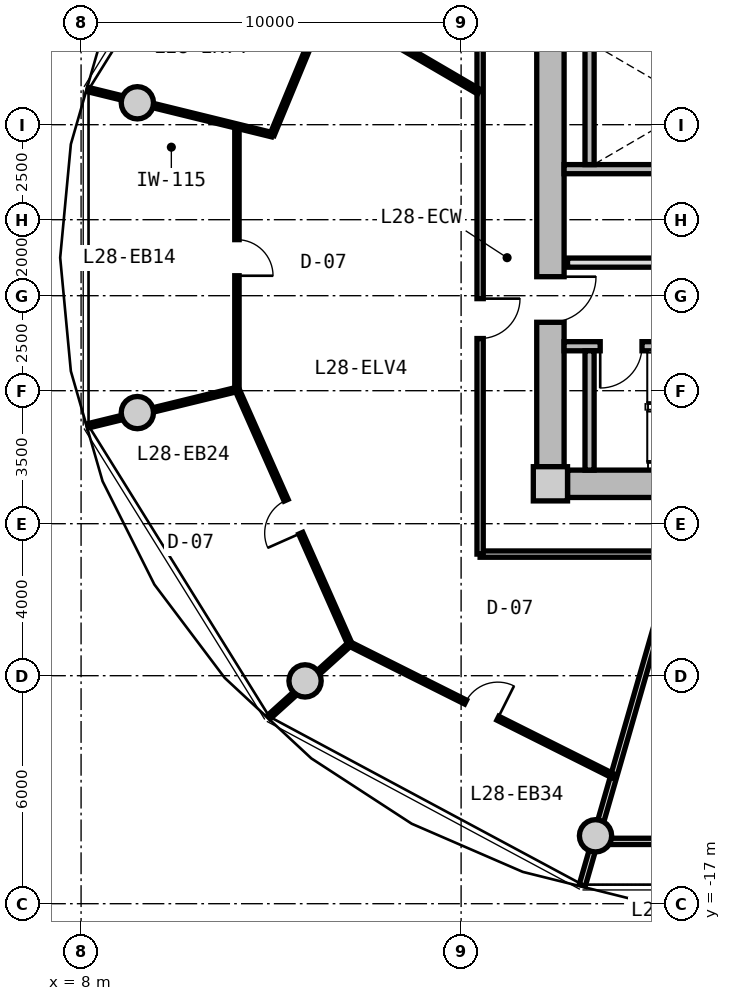
"""IFC4 building model, lengths in metres.
Left out: names, types, materials, properties, quantities, classifications, styles, units other than length and angle.
Written with IfcOpenShell. Run it as: python <this file> out.ifc"""

import sys

from ifc_helpers import new_model, si_unit, direction, frame, frame_2d, origin, origin_2d, place, context, subcontext, project, spatial, rectangle, circle, extrude, source, transform, mapped, element, fill, save


model = new_model("IFC4")
c1 = context("Model", 3, precision=1e-05, world=origin(), true_north=direction((0.0, 1.0)))
c2 = subcontext(c1, "Body", "Model", "MODEL_VIEW")
j1 = project(units=[si_unit("LENGTHUNIT", "METRE"), si_unit("PLANEANGLEUNIT", "RADIAN")], contexts=[c1])
p1 = place(None, origin())
s1 = spatial("IfcSite", under=j1, at=p1, CompositionType="ELEMENT")
p2 = place(p1, origin())
s2 = spatial("IfcBuilding", under=s1, at=p2, CompositionType="ELEMENT")
p3 = place(p2, frame((0.0, 0.0, 93.2)))
s3 = spatial("IfcBuildingStorey", under=s2, at=p3, CompositionType="ELEMENT", Elevation=93.2)
m1 = source(origin(), c2, "Body", "SweptSolid", [
    extrude(rectangle(XDim=0.9, YDim=0.9, at=origin_2d()), origin(), (0.0, 0.0, 1.0), 3.05),
])
p4 = place(p3, frame((20.35, -5.95, 0.0), z_axis=(0.0, 0.0, 1.0), x_axis=(1.0, 0.0, 0.0)))
e1 = element("IfcColumn", 1, at=p4, inside=s3, PredefinedType="COLUMN", context=c2, shape_type="MappedRepresentation", body=[
    mapped(m1, transform((0.0, 0.0, 0.0), x_axis=(1.0, 0.0, 0.0), y_axis=(0.0, 1.0, 0.0), z_axis=(0.0, 0.0, 1.0), scale=1.0)),
])
m2 = source(origin(), c2, "Body", "SweptSolid", [
    extrude(rectangle(XDim=14.4, YDim=0.72, at=frame_2d((7.2, 0.0))), origin(), (0.0, 0.0, 1.0), 2.79),
])
p5 = place(p3, frame((35.2, -5.95, 0.0), z_axis=(0.0, 0.0, 1.0), x_axis=(-1.0, 0.0, 0.0)))
e2 = element("IfcWall", 2, at=p5, inside=s3, PredefinedType="SHEAR", context=c2, shape_type="MappedRepresentation", body=[
    mapped(m2, transform((0.0, 0.0, 0.0), x_axis=(1.0, 0.0, 0.0), y_axis=(0.0, 1.0, 0.0), z_axis=(0.0, 0.0, 1.0), scale=1.0)),
])
m3 = source(origin(), c2, "Body", "SweptSolid", [
    extrude(rectangle(XDim=11.0, YDim=0.72, at=frame_2d((5.5, 0.0))), origin(), (0.0, 0.0, 1.0), 2.79),
])
p6 = place(p3, frame((20.35, -5.5, 0.0), z_axis=(0.0, 0.0, 1.0), x_axis=(0.0, 1.0, 0.0)))
e3 = element("IfcWall", 3, at=p6, inside=s3, PredefinedType="SHEAR", context=c2, shape_type="MappedRepresentation", body=[
    mapped(m3, transform((0.0, 0.0, 0.0), x_axis=(1.0, 0.0, 0.0), y_axis=(0.0, 1.0, 0.0), z_axis=(0.0, 0.0, 1.0), scale=1.0)),
])
p7 = place(p6, frame((3.8, 0.0, 0.0)))
e4 = element("IfcOpeningElement", 4, at=p7, cuts=e3, PredefinedType="OPENING", context=c2, shape_type="SweptSolid", body=[
    extrude(rectangle(XDim=1.2, YDim=2.15, at=frame_2d((0.6, 1.075))), frame((0.0, 0.37, 0.0), z_axis=(0.0, -1.0, 0.0), x_axis=(1.0, 0.0, 0.0)), (0.0, 0.0, 1.0), 0.74),
])
m4 = source(origin(), c2, "Body", "SweptSolid", [
    extrude(circle(Radius=0.425, at=origin_2d()), origin(), (0.0, 0.0, 1.0), 3.05),
])
for number, where, z_axis, x_axis in (
    (5, (9.481, 4.076, 0.0), (0.0, 0.0, 1.0), (1.0, 0.0, 0.0)),
    (6, (9.481, -4.076, 0.0), (0.0, 0.0, 1.0), (1.0, 0.0, 0.0)),
    (7, (13.894, -11.137, 0.0), (0.0, 0.0, 1.0), (1.0, 0.0, 0.0)),
    (8, (21.537, -15.213, 0.0), (0.0, 0.0, 1.0), (1.0, 0.0, 0.0)),
):
    element("IfcColumn", number, at=place(p3, frame(where, z_axis=z_axis, x_axis=x_axis)), inside=s3, PredefinedType="COLUMN", context=c2, shape_type="MappedRepresentation", body=[
        mapped(m4, transform((0.0, 0.0, 0.0), x_axis=(1.0, 0.0, 0.0), y_axis=(0.0, 1.0, 0.0), z_axis=(0.0, 0.0, 1.0), scale=1.0)),
    ])
m5 = source(origin(), c2, "Body", "SweptSolid", [
    extrude(rectangle(XDim=7.83, YDim=0.24, at=frame_2d((3.915, 0.0))), origin(), (0.0, 0.0, 1.0), 2.79),
])
p8 = place(p3, frame((20.71, 2.33, 0.0), z_axis=(0.0, 0.0, 1.0), x_axis=(1.0, 0.0, 0.0)))
e9 = element("IfcWall", 9, at=p8, inside=s3, PredefinedType="PARTITIONING", context=c2, shape_type="MappedRepresentation", body=[
    mapped(m5, transform((0.0, 0.0, 0.0), x_axis=(1.0, 0.0, 0.0), y_axis=(0.0, 1.0, 0.0), z_axis=(0.0, 0.0, 1.0), scale=1.0)),
])
m6 = source(origin(), c2, "Body", "SweptSolid", [
    extrude(rectangle(XDim=3.14, YDim=0.24, at=frame_2d((1.57, 0.0))), origin(), (0.0, 0.0, 1.0), 2.79),
])
p9 = place(p3, frame((21.38, 2.45, 0.0), z_axis=(0.0, 0.0, 1.0), x_axis=(0.0, 1.0, 0.0)))
e10 = element("IfcWall", 10, at=p9, inside=s3, PredefinedType="PARTITIONING", context=c2, shape_type="MappedRepresentation", body=[
    mapped(m6, transform((0.0, 0.0, 0.0), x_axis=(1.0, 0.0, 0.0), y_axis=(0.0, 1.0, 0.0), z_axis=(0.0, 0.0, 1.0), scale=1.0)),
])
p10 = place(p3, frame((20.71, -2.33, 0.0), z_axis=(0.0, 0.0, 1.0), x_axis=(1.0, 0.0, 0.0)))
e11 = element("IfcWall", 11, at=p10, inside=s3, PredefinedType="PARTITIONING", context=c2, shape_type="MappedRepresentation", body=[
    mapped(m5, transform((0.0, 0.0, 0.0), x_axis=(1.0, 0.0, 0.0), y_axis=(0.0, 1.0, 0.0), z_axis=(0.0, 0.0, 1.0), scale=1.0)),
])
p11 = place(p10, frame((0.95, 0.0, 0.0)))
e12 = element("IfcOpeningElement", 12, at=p11, cuts=e11, PredefinedType="OPENING", context=c2, shape_type="SweptSolid", body=[
    extrude(rectangle(XDim=1.1, YDim=2.15, at=frame_2d((0.55, 1.075))), frame((0.0, 0.13, 0.0), z_axis=(0.0, -1.0, 0.0), x_axis=(1.0, 0.0, 0.0)), (0.0, 0.0, 1.0), 0.26),
])
p12 = place(p3, frame((21.38, -5.59, 0.0), z_axis=(0.0, 0.0, 1.0), x_axis=(0.0, 1.0, 0.0)))
e13 = element("IfcWall", 13, at=p12, inside=s3, PredefinedType="PARTITIONING", context=c2, shape_type="MappedRepresentation", body=[
    mapped(m6, transform((0.0, 0.0, 0.0), x_axis=(1.0, 0.0, 0.0), y_axis=(0.0, 1.0, 0.0), z_axis=(0.0, 0.0, 1.0), scale=1.0)),
])
m7 = source(origin(), c2, "Body", "SweptSolid", [
    extrude(rectangle(XDim=7.62, YDim=0.24, at=frame_2d((3.81, 0.0))), origin(), (0.0, 0.0, 1.0), 2.775),
])
p13 = place(p3, frame((20.8, -0.13, 0.0), z_axis=(0.0, 0.0, 1.0), x_axis=(1.0, 0.0, 0.0)))
e14 = element("IfcWall", 14, at=p13, inside=s3, PredefinedType="PARTITIONING", context=c2, shape_type="MappedRepresentation", body=[
    mapped(m7, transform((0.0, 0.0, 0.0), x_axis=(1.0, 0.0, 0.0), y_axis=(0.0, 1.0, 0.0), z_axis=(0.0, 0.0, 1.0), scale=1.0)),
])
p14 = place(p13, frame((6.22, 0.0, 0.0)))
e15 = element("IfcOpeningElement", 15, at=p14, cuts=e14, PredefinedType="OPENING", context=c2, shape_type="SweptSolid", body=[
    extrude(rectangle(XDim=1.0, YDim=2.1, at=frame_2d((0.5, 1.05))), frame((0.0, 0.13, 0.0), z_axis=(0.0, -1.0, 0.0), x_axis=(1.0, 0.0, 0.0)), (0.0, 0.0, 1.0), 0.26),
])
p15 = place(p13, frame((2.4, 0.0, 0.0)))
e16 = element("IfcOpeningElement", 16, at=p15, cuts=e14, PredefinedType="OPENING", context=c2, shape_type="SweptSolid", body=[
    extrude(rectangle(XDim=1.0, YDim=2.1, at=frame_2d((0.5, 1.05))), frame((0.0, 0.13, 0.0), z_axis=(0.0, -1.0, 0.0), x_axis=(1.0, 0.0, 0.0)), (0.0, 0.0, 1.0), 0.26),
])
m8 = source(origin(), c2, "Body", "SweptSolid", [
    extrude(rectangle(XDim=8.6, YDim=0.165, at=frame_2d((4.3, 0.0))), origin(), (0.0, 0.0, 1.0), 2.775),
])
p16 = place(p3, frame((27.1, -7.8, 0.0), z_axis=(0.0, 0.0, 1.0), x_axis=(-1.0, 0.0, 0.0)))
e17 = element("IfcWall", 17, at=p16, inside=s3, PredefinedType="PARTITIONING", context=c2, shape_type="MappedRepresentation", body=[
    mapped(m8, transform((0.0, 0.0, 0.0), x_axis=(1.0, 0.0, 0.0), y_axis=(0.0, 1.0, 0.0), z_axis=(0.0, 0.0, 1.0), scale=1.0)),
])
m9 = source(origin(), c2, "Body", "SweptSolid", [
    extrude(rectangle(XDim=15.6, YDim=0.165, at=frame_2d((7.8, 0.0))), origin(), (0.0, 0.0, 1.0), 2.775),
])
p17 = place(p3, frame((18.5, -7.8, 0.0), z_axis=(0.0, 0.0, 1.0), x_axis=(0.0, 1.0, 0.0)))
e18 = element("IfcWall", 18, at=p17, inside=s3, PredefinedType="PARTITIONING", context=c2, shape_type="MappedRepresentation", body=[
    mapped(m9, transform((0.0, 0.0, 0.0), x_axis=(1.0, 0.0, 0.0), y_axis=(0.0, 1.0, 0.0), z_axis=(0.0, 0.0, 1.0), scale=1.0)),
])
p18 = place(p17, frame((5.673, 0.0, 0.0)))
e19 = element("IfcOpeningElement", 19, at=p18, cuts=e18, PredefinedType="OPENING", context=c2, shape_type="SweptSolid", body=[
    extrude(rectangle(XDim=1.05, YDim=2.15, at=frame_2d((0.525, 1.075))), frame((0.0, 0.093, 0.0), z_axis=(0.0, -1.0, 0.0), x_axis=(1.0, 0.0, 0.0)), (0.0, 0.0, 1.0), 0.185),
])
m10 = source(origin(), c2, "Body", "SweptSolid", [
    extrude(rectangle(XDim=8.989, YDim=0.165, at=frame_2d((4.495, 0.0))), origin(), (0.0, 0.0, 1.0), 2.275),
])
p19 = place(p3, frame((23.678, -7.88, 0.0), z_axis=(0.0, 0.0, 1.0), x_axis=(-0.27702323008, -0.960863221274, 0.0)))
e20 = element("IfcWall", 20, at=p19, inside=s3, PredefinedType="PARTITIONING", context=c2, shape_type="MappedRepresentation", body=[
    mapped(m10, transform((0.0, 0.0, 0.0), x_axis=(1.0, 0.0, 0.0), y_axis=(0.0, 1.0, 0.0), z_axis=(0.0, 0.0, 1.0), scale=1.0)),
])
m11 = source(origin(), c2, "Body", "SweptSolid", [
    extrude(rectangle(XDim=5.814, YDim=0.165, at=frame_2d((2.907, 0.0))), origin(), (0.0, 0.0, 1.0), 2.275),
])
p20 = place(p3, frame((21.366, -15.36, 0.0), z_axis=(0.0, 0.0, 1.0), x_axis=(1.0, 0.0, 0.0)))
e21 = element("IfcWall", 21, at=p20, inside=s3, PredefinedType="PARTITIONING", context=c2, shape_type="MappedRepresentation", body=[
    mapped(m11, transform((0.0, 0.0, 0.0), x_axis=(1.0, 0.0, 0.0), y_axis=(0.0, 1.0, 0.0), z_axis=(0.0, 0.0, 1.0), scale=1.0)),
])
m12 = source(origin(), c2, "Body", "SweptSolid", [
    extrude(rectangle(XDim=6.935, YDim=0.115, at=frame_2d((3.468, 0.0))), origin(), (0.0, 0.0, 1.0), 2.775),
])
p21 = place(p3, frame((12.101, 3.468, 0.0), z_axis=(0.0, 0.0, 1.0), x_axis=(0.0, -1.0, 0.0)))
e22 = element("IfcWall", 22, at=p21, inside=s3, PredefinedType="PARTITIONING", context=c2, shape_type="MappedRepresentation", body=[
    mapped(m12, transform((0.0, 0.0, 0.0), x_axis=(1.0, 0.0, 0.0), y_axis=(0.0, 1.0, 0.0), z_axis=(0.0, 0.0, 1.0), scale=1.0)),
])
p22 = place(p21, frame((2.993, 0.0, 0.0)))
e23 = element("IfcOpeningElement", 23, at=p22, cuts=e22, PredefinedType="OPENING", context=c2, shape_type="SweptSolid", body=[
    extrude(rectangle(XDim=0.95, YDim=2.1, at=frame_2d((0.475, 1.05))), frame((0.0, 0.067, 0.0), z_axis=(0.0, -1.0, 0.0), x_axis=(1.0, 0.0, 0.0)), (0.0, 0.0, 1.0), 0.135),
])
m13 = source(origin(), c2, "Body", "SweptSolid", [
    extrude(rectangle(XDim=4.992, YDim=0.115, at=frame_2d((2.496, 0.0))), origin(), (0.0, 0.0, 1.0), 2.275),
])
p23 = place(p3, frame((13.026, 3.236, 0.0), z_axis=(0.0, 0.0, 1.0), x_axis=(-0.971191841847, 0.238298985162, 0.0)))
e24 = element("IfcWall", 24, at=p23, inside=s3, PredefinedType="PARTITIONING", context=c2, shape_type="MappedRepresentation", body=[
    mapped(m13, transform((0.0, 0.0, 0.0), x_axis=(1.0, 0.0, 0.0), y_axis=(0.0, 1.0, 0.0), z_axis=(0.0, 0.0, 1.0), scale=1.0)),
])
m14 = source(origin(), c2, "Body", "SweptSolid", [
    extrude(rectangle(XDim=7.326, YDim=0.115, at=frame_2d((3.663, 0.0))), origin(), (0.0, 0.0, 1.0), 2.775),
])
p24 = place(p3, frame((12.104, -3.467, 0.0), z_axis=(0.0, 0.0, 1.0), x_axis=(0.405263245425, -0.914200033859, 0.0)))
e25 = element("IfcWall", 25, at=p24, inside=s3, PredefinedType="PARTITIONING", context=c2, shape_type="MappedRepresentation", body=[
    mapped(m14, transform((0.0, 0.0, 0.0), x_axis=(1.0, 0.0, 0.0), y_axis=(0.0, 1.0, 0.0), z_axis=(0.0, 0.0, 1.0), scale=1.0)),
])
p25 = place(p24, frame((3.188, 0.0, 0.0)))
e26 = element("IfcOpeningElement", 26, at=p25, cuts=e25, PredefinedType="OPENING", context=c2, shape_type="SweptSolid", body=[
    extrude(rectangle(XDim=0.95, YDim=2.1, at=frame_2d((0.475, 1.05))), frame((0.0, 0.067, 0.0), z_axis=(0.0, -1.0, 0.0), x_axis=(1.0, 0.0, 0.0)), (0.0, 0.0, 1.0), 0.135),
])
m15 = source(origin(), c2, "Body", "SweptSolid", [
    extrude(rectangle(XDim=4.042, YDim=0.115, at=frame_2d((2.021, 0.0))), origin(), (0.0, 0.0, 1.0), 2.275),
])
p26 = place(p3, frame((12.104, -3.467, 0.0), z_axis=(0.0, 0.0, 1.0), x_axis=(-0.971460277747, -0.237202295014, 0.0)))
e27 = element("IfcWall", 27, at=p26, inside=s3, PredefinedType="PARTITIONING", context=c2, shape_type="MappedRepresentation", body=[
    mapped(m15, transform((0.0, 0.0, 0.0), x_axis=(1.0, 0.0, 0.0), y_axis=(0.0, 1.0, 0.0), z_axis=(0.0, 0.0, 1.0), scale=1.0)),
])
m16 = source(origin(), c2, "Body", "SweptSolid", [
    extrude(rectangle(XDim=7.767, YDim=0.115, at=frame_2d((3.884, 0.0))), origin(), (0.0, 0.0, 1.0), 2.775),
])
p27 = place(p3, frame((15.07, -10.167, 0.0), z_axis=(0.0, 0.0, 1.0), x_axis=(0.894188177352, -0.447691303783, 0.0)))
e28 = element("IfcWall", 28, at=p27, inside=s3, PredefinedType="PARTITIONING", context=c2, shape_type="MappedRepresentation", body=[
    mapped(m16, transform((0.0, 0.0, 0.0), x_axis=(1.0, 0.0, 0.0), y_axis=(0.0, 1.0, 0.0), z_axis=(0.0, 0.0, 1.0), scale=1.0)),
])
p28 = place(p27, frame((3.409, 0.0, 0.0)))
e29 = element("IfcOpeningElement", 29, at=p28, cuts=e28, PredefinedType="OPENING", context=c2, shape_type="SweptSolid", body=[
    extrude(rectangle(XDim=0.95, YDim=2.1, at=frame_2d((0.475, 1.05))), frame((0.0, 0.067, 0.0), z_axis=(0.0, -1.0, 0.0), x_axis=(1.0, 0.0, 0.0)), (0.0, 0.0, 1.0), 0.135),
])
m17 = source(origin(), c2, "Body", "SweptSolid", [
    extrude(rectangle(XDim=2.871, YDim=0.115, at=frame_2d((1.435, 0.0))), origin(), (0.0, 0.0, 1.0), 2.275),
])
p29 = place(p3, frame((15.07, -10.167, 0.0), z_axis=(0.0, 0.0, 1.0), x_axis=(-0.742125841552, -0.670260572688, 0.0)))
e30 = element("IfcWall", 30, at=p29, inside=s3, PredefinedType="PARTITIONING", context=c2, shape_type="MappedRepresentation", body=[
    mapped(m17, transform((0.0, 0.0, 0.0), x_axis=(1.0, 0.0, 0.0), y_axis=(0.0, 1.0, 0.0), z_axis=(0.0, 0.0, 1.0), scale=1.0)),
])
m18 = source(origin(), c2, "Body", "SweptSolid", [
    extrude(rectangle(XDim=3.069, YDim=0.14, at=frame_2d((1.535, 0.0))), origin(), (0.0, 0.0, 1.0), 2.775),
])
p30 = place(p3, frame((18.47, 4.368, 0.0), z_axis=(0.0, 0.0, 1.0), x_axis=(-0.863524911282, 0.504306184371, 0.0)))
e31 = element("IfcWall", 31, at=p30, inside=s3, PredefinedType="PARTITIONING", context=c2, shape_type="MappedRepresentation", body=[
    mapped(m18, transform((0.0, 0.0, 0.0), x_axis=(1.0, 0.0, 0.0), y_axis=(0.0, 1.0, 0.0), z_axis=(0.0, 0.0, 1.0), scale=1.0)),
])
m19 = source(origin(), c2, "Body", "SweptSolid", [
    extrude(rectangle(XDim=3.306, YDim=0.115, at=frame_2d((1.653, 0.0))), origin(), (0.0, 0.0, 1.0), 2.775),
])
p31 = place(p3, frame((14.292, 6.29, 0.0), z_axis=(0.0, 0.0, 1.0), x_axis=(-0.382506175075, -0.923952934965, 0.0)))
e32 = element("IfcWall", 32, at=p31, inside=s3, PredefinedType="PARTITIONING", context=c2, shape_type="MappedRepresentation", body=[
    mapped(m19, transform((0.0, 0.0, 0.0), x_axis=(1.0, 0.0, 0.0), y_axis=(0.0, 1.0, 0.0), z_axis=(0.0, 0.0, 1.0), scale=1.0)),
])
m20 = source(origin(), c2, "Body", "SweptSolid", [
    extrude(rectangle(XDim=1.1, YDim=2.15, at=frame_2d((0.55, 1.075))), frame((0.0, 0.025, 0.0), z_axis=(0.0, -1.0, 0.0), x_axis=(1.0, 0.0, 0.0)), (0.0, 0.0, 1.0), 0.05),
])
p32 = place(p11, frame((1.1, 0.0, 0.0), z_axis=(0.0, 0.0, 1.0), x_axis=(-1.0, 0.0, 0.0)))
e33 = element("IfcDoor", 33, at=p32, inside=s3, OperationType="SINGLE_SWING_RIGHT", PredefinedType="DOOR", context=c2, shape_type="MappedRepresentation", body=[
    mapped(m20, transform((0.0, 0.0, 0.0), x_axis=(1.0, 0.0, 0.0), y_axis=(0.0, 1.0, 0.0), z_axis=(0.0, 0.0, 1.0), scale=1.0)),
])
fill(e12, e33)
m21 = source(origin(), c2, "Body", "SweptSolid", [
    extrude(rectangle(XDim=1.2, YDim=2.15, at=frame_2d((0.6, 1.075))), frame((0.0, 0.025, 0.0), z_axis=(0.0, -1.0, 0.0), x_axis=(1.0, 0.0, 0.0)), (0.0, 0.0, 1.0), 0.05),
])
p33 = place(p7, frame((1.2, 0.0, 0.0), z_axis=(0.0, 0.0, 1.0), x_axis=(-1.0, 0.0, 0.0)))
e34 = element("IfcDoor", 34, at=p33, inside=s3, OperationType="SINGLE_SWING_LEFT", PredefinedType="DOOR", context=c2, shape_type="MappedRepresentation", body=[
    mapped(m21, transform((0.0, 0.0, 0.0), x_axis=(1.0, 0.0, 0.0), y_axis=(0.0, 1.0, 0.0), z_axis=(0.0, 0.0, 1.0), scale=1.0)),
])
fill(e4, e34)
m22 = source(origin(), c2, "Body", "SweptSolid", [
    extrude(rectangle(XDim=1.05, YDim=2.15, at=frame_2d((0.525, 1.075))), frame((0.0, 0.025, 0.0), z_axis=(0.0, -1.0, 0.0), x_axis=(1.0, 0.0, 0.0)), (0.0, 0.0, 1.0), 0.05),
])
p34 = place(p18, frame((1.05, 0.0, 0.0), z_axis=(0.0, 0.0, 1.0), x_axis=(-1.0, 0.0, 0.0)))
e35 = element("IfcDoor", 35, at=p34, inside=s3, OperationType="SINGLE_SWING_LEFT", PredefinedType="DOOR", context=c2, shape_type="MappedRepresentation", body=[
    mapped(m22, transform((0.0, 0.0, 0.0), x_axis=(1.0, 0.0, 0.0), y_axis=(0.0, 1.0, 0.0), z_axis=(0.0, 0.0, 1.0), scale=1.0)),
])
fill(e19, e35)
m23 = source(origin(), c2, "Body", "SweptSolid", [
    extrude(rectangle(XDim=0.95, YDim=2.1, at=frame_2d((0.475, 1.05))), frame((0.0, 0.025, 0.0), z_axis=(0.0, -1.0, 0.0), x_axis=(1.0, 0.0, 0.0)), (0.0, 0.0, 1.0), 0.05),
])
p35 = place(p22, origin())
e36 = element("IfcDoor", 36, at=p35, inside=s3, OperationType="SINGLE_SWING_RIGHT", PredefinedType="DOOR", context=c2, shape_type="MappedRepresentation", body=[
    mapped(m23, transform((0.0, 0.0, 0.0), x_axis=(1.0, 0.0, 0.0), y_axis=(0.0, 1.0, 0.0), z_axis=(0.0, 0.0, 1.0), scale=1.0)),
])
fill(e23, e36)
p36 = place(p25, frame((0.95, 0.0, 0.0), z_axis=(0.0, 0.0, 1.0), x_axis=(-1.0, 0.0, 0.0)))
e37 = element("IfcDoor", 37, at=p36, inside=s3, OperationType="SINGLE_SWING_LEFT", PredefinedType="DOOR", context=c2, shape_type="MappedRepresentation", body=[
    mapped(m23, transform((0.0, 0.0, 0.0), x_axis=(1.0, 0.0, 0.0), y_axis=(0.0, 1.0, 0.0), z_axis=(0.0, 0.0, 1.0), scale=1.0)),
])
fill(e26, e37)
p37 = place(p28, origin())
e38 = element("IfcDoor", 38, at=p37, inside=s3, OperationType="SINGLE_SWING_RIGHT", PredefinedType="DOOR", context=c2, shape_type="MappedRepresentation", body=[
    mapped(m23, transform((0.0, 0.0, 0.0), x_axis=(1.0, 0.0, 0.0), y_axis=(0.0, 1.0, 0.0), z_axis=(0.0, 0.0, 1.0), scale=1.0)),
])
fill(e29, e38)
save(model, sys.argv[1])
